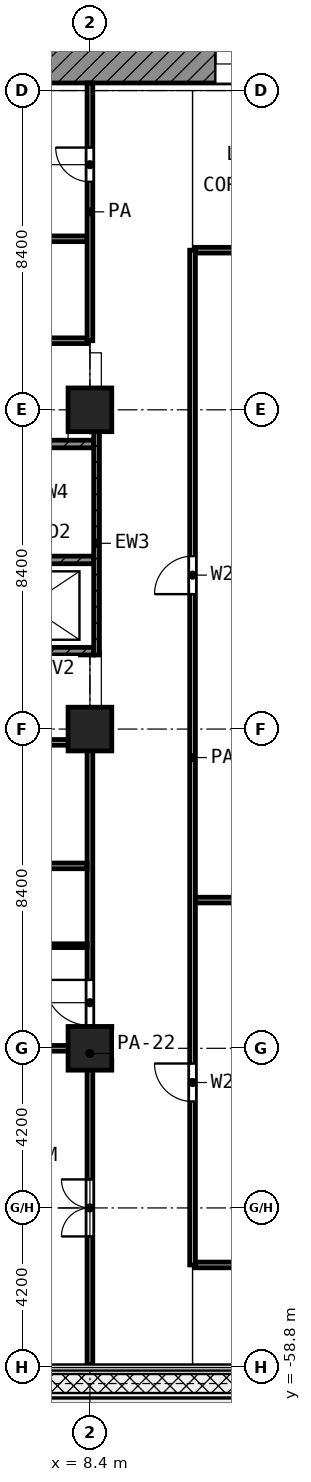
"""IFC4 building model, lengths in metres.
Left out: names, types, materials, properties, quantities, classifications, styles, units other than length and angle.
Written with IfcOpenShell. Run it as: python <this file> out.ifc"""

import sys

from ifc_helpers import new_model, si_unit, direction, frame, frame_2d, origin, origin_2d, place, context, subcontext, project, spatial, rectangle, extrude, element, fill, save


model = new_model("IFC4")
c1 = context("Model", 3, precision=1e-05, world=origin(), true_north=direction((0.0, 1.0)))
c2 = subcontext(c1, "Body", "Model", "MODEL_VIEW")
j1 = project(units=[si_unit("LENGTHUNIT", "METRE"), si_unit("PLANEANGLEUNIT", "RADIAN")], contexts=[c1])
p1 = place(None, origin())
s1 = spatial("IfcSite", under=j1, at=p1, CompositionType="ELEMENT")
p2 = place(p1, origin())
s2 = spatial("IfcBuilding", under=s1, at=p2, CompositionType="ELEMENT")
p3 = place(p2, frame((0.0, 0.0, 136.6)))
s3 = spatial("IfcBuildingStorey", under=s2, at=p3, CompositionType="ELEMENT", Elevation=136.6)
for number, where, z_axis, x_axis in (
    (1, (8.4, -33.6, 0.0), (0.0, 0.0, 1.0), (1.0, 0.0, 0.0)),
    (2, (8.4, -42.0, 0.0), (0.0, 0.0, 1.0), (1.0, 0.0, 0.0)),
    (3, (8.4, -50.4, 0.0), (0.0, 0.0, 1.0), (1.0, 0.0, 0.0)),
):
    element("IfcColumn", number, at=place(p3, frame(where, z_axis=z_axis, x_axis=x_axis)), inside=s3, PredefinedType="COLUMN", context=c2, shape_type="SweptSolid", body=[
        extrude(rectangle(XDim=1.15, YDim=1.15, at=origin_2d()), origin(), (0.0, 0.0, 1.0), 4.2),
    ])
p4 = place(p3, frame((5.4, -24.5, 0.0), z_axis=(0.0, 0.0, 1.0), x_axis=(1.0, 0.0, 0.0)))
e4 = element("IfcWall", 4, at=p4, inside=s3, PredefinedType="SHEAR", context=c2, shape_type="SweptSolid", body=[
    extrude(rectangle(XDim=18.6, YDim=1.0, at=frame_2d((9.3, 0.0))), origin(), (0.0, 0.0, 1.0), 3.6),
])
p5 = place(p4, frame((6.3, 0.0, 0.0)))
e5 = element("IfcOpeningElement", 5, at=p5, cuts=e4, PredefinedType="OPENING", context=c2, shape_type="SweptSolid", body=[
    extrude(rectangle(XDim=1.8, YDim=2.1, at=frame_2d((0.9, 1.05))), frame((0.0, 0.51, 0.0), z_axis=(0.0, -1.0, 0.0), x_axis=(1.0, 0.0, 0.0)), (0.0, 0.0, 1.0), 1.02),
])
p6 = place(p3, frame((8.575, -40.05, 0.0), z_axis=(0.0, 0.0, 1.0), x_axis=(0.0, 1.0, 0.0)))
e6 = element("IfcWall", 6, at=p6, inside=s3, PredefinedType="SHEAR", context=c2, shape_type="SweptSolid", body=[
    extrude(rectangle(XDim=5.875, YDim=0.15, at=frame_2d((2.938, 0.0))), origin(), (0.0, 0.0, 1.0), 3.6),
])
p7 = place(p3, frame((0.45, -34.5, 0.0), z_axis=(0.0, 0.0, 1.0), x_axis=(1.0, 0.0, 0.0)))
e7 = element("IfcWall", 7, at=p7, inside=s3, PredefinedType="SHEAR", context=c2, shape_type="SweptSolid", body=[
    extrude(rectangle(XDim=8.05, YDim=0.2, at=frame_2d((4.025, 0.0))), origin(), (0.0, 0.0, 1.0), 3.6),
])
p8 = place(p7, frame((0.75, 0.0, 0.0)))
e8 = element("IfcOpeningElement", 8, at=p8, cuts=e7, PredefinedType="OPENING", context=c2, shape_type="SweptSolid", body=[
    extrude(rectangle(XDim=1.1, YDim=2.1, at=frame_2d((0.55, 1.05))), frame((0.0, 0.11, 0.0), z_axis=(0.0, -1.0, 0.0), x_axis=(1.0, 0.0, 0.0)), (0.0, 0.0, 1.0), 0.22),
])
p9 = place(p3, frame((0.45, -37.55, 0.0), z_axis=(0.0, 0.0, 1.0), x_axis=(1.0, 0.0, 0.0)))
e9 = element("IfcWall", 9, at=p9, inside=s3, PredefinedType="SHEAR", context=c2, shape_type="SweptSolid", body=[
    extrude(rectangle(XDim=8.05, YDim=0.2, at=frame_2d((4.025, 0.0))), origin(), (0.0, 0.0, 1.0), 3.6),
])
p10 = place(p9, frame((0.1, 0.0, 0.0)))
e10 = element("IfcOpeningElement", 10, at=p10, cuts=e9, PredefinedType="OPENING", context=c2, shape_type="SweptSolid", body=[
    extrude(rectangle(XDim=1.1, YDim=2.1, at=frame_2d((0.55, 1.05))), frame((0.0, 0.11, 0.0), z_axis=(0.0, -1.0, 0.0), x_axis=(1.0, 0.0, 0.0)), (0.0, 0.0, 1.0), 0.22),
])
p11 = place(p3, frame((0.45, -39.95, 0.0), z_axis=(0.0, 0.0, 1.0), x_axis=(1.0, 0.0, 0.0)))
e11 = element("IfcWall", 11, at=p11, inside=s3, PredefinedType="SHEAR", context=c2, shape_type="SweptSolid", body=[
    extrude(rectangle(XDim=8.05, YDim=0.2, at=frame_2d((4.025, 0.0))), origin(), (0.0, 0.0, 1.0), 3.6),
])
p12 = place(p11, frame((2.0, 0.0, 0.0)))
e12 = element("IfcOpeningElement", 12, at=p12, cuts=e11, PredefinedType="OPENING", context=c2, shape_type="SweptSolid", body=[
    extrude(rectangle(XDim=1.1, YDim=2.1, at=frame_2d((0.55, 1.05))), frame((0.0, 0.11, 0.0), z_axis=(0.0, -1.0, 0.0), x_axis=(1.0, 0.0, 0.0)), (0.0, 0.0, 1.0), 0.22),
])
p13 = place(p3, frame((5.75, -47.7, 0.0), z_axis=(0.0, 0.0, 1.0), x_axis=(1.0, 0.0, 0.0)))
e13 = element("IfcWall", 13, at=p13, inside=s3, PredefinedType="PARTITIONING", context=c2, shape_type="SweptSolid", body=[
    extrude(rectangle(XDim=2.575, YDim=0.1, at=frame_2d((1.288, 0.0))), origin(), (0.0, 0.0, 1.0), 3.6),
])
p14 = place(p3, frame((11.175, -56.1, 0.0), z_axis=(0.0, 0.0, 1.0), x_axis=(1.0, 0.0, 0.0)))
e14 = element("IfcWall", 14, at=p14, inside=s3, PredefinedType="PARTITIONING", context=c2, shape_type="SweptSolid", body=[
    extrude(rectangle(XDim=2.85, YDim=0.15, at=frame_2d((1.425, 0.0))), origin(), (0.0, 0.0, 1.0), 3.6),
])
p15 = place(p3, frame((0.08, -50.4, 0.0), z_axis=(0.0, 0.0, 1.0), x_axis=(1.0, 0.0, 0.0)))
e15 = element("IfcWall", 15, at=p15, inside=s3, PredefinedType="PARTITIONING", context=c2, shape_type="SweptSolid", body=[
    extrude(rectangle(XDim=8.245, YDim=0.15, at=frame_2d((4.123, 0.0))), origin(), (0.0, 0.0, 1.0), 3.6),
])
p16 = place(p3, frame((11.175, -46.5, 0.0), z_axis=(0.0, 0.0, 1.0), x_axis=(1.0, 0.0, 0.0)))
e16 = element("IfcWall", 16, at=p16, inside=s3, PredefinedType="PARTITIONING", context=c2, shape_type="SweptSolid", body=[
    extrude(rectangle(XDim=2.85, YDim=0.15, at=frame_2d((1.425, 0.0))), origin(), (0.0, 0.0, 1.0), 3.6),
])
p17 = place(p3, frame((0.08, -45.6, 0.0), z_axis=(0.0, 0.0, 1.0), x_axis=(1.0, 0.0, 0.0)))
e17 = element("IfcWall", 17, at=p17, inside=s3, PredefinedType="PARTITIONING", context=c2, shape_type="SweptSolid", body=[
    extrude(rectangle(XDim=8.245, YDim=0.15, at=frame_2d((4.123, 0.0))), origin(), (0.0, 0.0, 1.0), 3.6),
])
p18 = place(p3, frame((2.327, -42.35, 0.0), z_axis=(0.0, 0.0, 1.0), x_axis=(1.0, 0.0, 0.0)))
e18 = element("IfcWall", 18, at=p18, inside=s3, PredefinedType="PARTITIONING", context=c2, shape_type="SweptSolid", body=[
    extrude(rectangle(XDim=5.998, YDim=0.15, at=frame_2d((2.999, 0.0))), origin(), (0.0, 0.0, 1.0), 3.6),
])
p19 = place(p18, frame((2.499, 0.0, 0.0)))
e19 = element("IfcOpeningElement", 19, at=p19, cuts=e18, PredefinedType="OPENING", context=c2, shape_type="SweptSolid", body=[
    extrude(rectangle(XDim=1.0, YDim=2.1, at=frame_2d((0.5, 1.05))), frame((0.0, 0.085, 0.0), z_axis=(0.0, -1.0, 0.0), x_axis=(1.0, 0.0, 0.0)), (0.0, 0.0, 1.0), 0.17),
])
p20 = place(p3, frame((1.077, -31.782, 0.0), z_axis=(0.0, 0.0, 1.0), x_axis=(1.0, 0.0, 0.0)))
e20 = element("IfcWall", 20, at=p20, inside=s3, PredefinedType="PARTITIONING", context=c2, shape_type="SweptSolid", body=[
    extrude(rectangle(XDim=7.248, YDim=0.15, at=frame_2d((3.624, 0.0))), origin(), (0.0, 0.0, 1.0), 3.6),
])
p21 = place(p20, frame((3.024, 0.0, 0.0)))
e21 = element("IfcOpeningElement", 21, at=p21, cuts=e20, PredefinedType="OPENING", context=c2, shape_type="SweptSolid", body=[
    extrude(rectangle(XDim=1.2, YDim=2.1, at=frame_2d((0.6, 1.05))), frame((0.0, 0.085, 0.0), z_axis=(0.0, -1.0, 0.0), x_axis=(1.0, 0.0, 0.0)), (0.0, 0.0, 1.0), 0.17),
])
p22 = place(p3, frame((11.175, -29.4, 0.0), z_axis=(0.0, 0.0, 1.0), x_axis=(1.0, 0.0, 0.0)))
e22 = element("IfcWall", 22, at=p22, inside=s3, PredefinedType="PARTITIONING", context=c2, shape_type="SweptSolid", body=[
    extrude(rectangle(XDim=2.85, YDim=0.15, at=frame_2d((1.425, 0.0))), origin(), (0.0, 0.0, 1.0), 3.6),
])
p23 = place(p3, frame((0.08, -29.1, 0.0), z_axis=(0.0, 0.0, 1.0), x_axis=(1.0, 0.0, 0.0)))
e23 = element("IfcWall", 23, at=p23, inside=s3, PredefinedType="PARTITIONING", context=c2, shape_type="SweptSolid", body=[
    extrude(rectangle(XDim=8.245, YDim=0.15, at=frame_2d((4.123, 0.0))), origin(), (0.0, 0.0, 1.0), 3.6),
])
p24 = place(p3, frame((8.4, -58.72, 0.0), z_axis=(0.0, 0.0, 1.0), x_axis=(0.0, 1.0, 0.0)))
e24 = element("IfcWall", 24, at=p24, inside=s3, PredefinedType="PARTITIONING", context=c2, shape_type="SweptSolid", body=[
    extrude(rectangle(XDim=16.37, YDim=0.15, at=frame_2d((8.185, 0.0))), origin(), (0.0, 0.0, 1.0), 2.7),
])
p25 = place(p24, frame((8.92, 0.0, 0.0)))
e25 = element("IfcOpeningElement", 25, at=p25, cuts=e24, PredefinedType="OPENING", context=c2, shape_type="SweptSolid", body=[
    extrude(rectangle(XDim=1.2, YDim=2.1, at=frame_2d((0.6, 1.05))), frame((0.0, 0.085, 0.0), z_axis=(0.0, -1.0, 0.0), x_axis=(1.0, 0.0, 0.0)), (0.0, 0.0, 1.0), 0.17),
])
p26 = place(p24, frame((3.37, 0.0, 0.0)))
e26 = element("IfcOpeningElement", 26, at=p26, cuts=e24, PredefinedType="OPENING", context=c2, shape_type="SweptSolid", body=[
    extrude(rectangle(XDim=1.5, YDim=2.1, at=frame_2d((0.75, 1.05))), frame((0.0, 0.085, 0.0), z_axis=(0.0, -1.0, 0.0), x_axis=(1.0, 0.0, 0.0)), (0.0, 0.0, 1.0), 0.17),
])
p27 = place(p3, frame((8.4, -31.782, 0.0), z_axis=(0.0, 0.0, 1.0), x_axis=(0.0, 1.0, 0.0)))
e27 = element("IfcWall", 27, at=p27, inside=s3, PredefinedType="PARTITIONING", context=c2, shape_type="SweptSolid", body=[
    extrude(rectangle(XDim=6.782, YDim=0.15, at=frame_2d((3.391, 0.0))), origin(), (0.0, 0.0, 1.0), 3.6),
])
p28 = place(p27, frame((4.182, 0.0, 0.0)))
e28 = element("IfcOpeningElement", 28, at=p28, cuts=e27, PredefinedType="OPENING", context=c2, shape_type="SweptSolid", body=[
    extrude(rectangle(XDim=0.9, YDim=2.1, at=frame_2d((0.45, 1.05))), frame((0.0, 0.085, 0.0), z_axis=(0.0, -1.0, 0.0), x_axis=(1.0, 0.0, 0.0)), (0.0, 0.0, 1.0), 0.17),
])
p29 = place(p3, frame((11.1, -56.1, 0.0), z_axis=(0.0, 0.0, 1.0), x_axis=(0.0, 1.0, 0.0)))
e29 = element("IfcWall", 29, at=p29, inside=s3, PredefinedType="PARTITIONING", context=c2, shape_type="SweptSolid", body=[
    extrude(rectangle(XDim=26.7, YDim=0.15, at=frame_2d((13.35, 0.0))), origin(), (0.0, 0.0, 1.0), 3.6),
])
p30 = place(p29, frame((17.65, 0.0, 0.0)))
e30 = element("IfcOpeningElement", 30, at=p30, cuts=e29, PredefinedType="OPENING", context=c2, shape_type="SweptSolid", body=[
    extrude(rectangle(XDim=1.0, YDim=2.1, at=frame_2d((0.5, 1.05))), frame((0.0, 0.085, 0.0), z_axis=(0.0, -1.0, 0.0), x_axis=(1.0, 0.0, 0.0)), (0.0, 0.0, 1.0), 0.17),
])
p31 = place(p29, frame((4.3, 0.0, 0.0)))
e31 = element("IfcOpeningElement", 31, at=p31, cuts=e29, PredefinedType="OPENING", context=c2, shape_type="SweptSolid", body=[
    extrude(rectangle(XDim=1.0, YDim=2.1, at=frame_2d((0.5, 1.05))), frame((0.0, 0.085, 0.0), z_axis=(0.0, -1.0, 0.0), x_axis=(1.0, 0.0, 0.0)), (0.0, 0.0, 1.0), 0.17),
])
p32 = place(p5, origin())
e32 = element("IfcDoor", 32, at=p32, inside=s3, OperationType="DOUBLE_DOOR_SINGLE_SWING", PredefinedType="DOOR", context=c2, shape_type="SweptSolid", body=[
    extrude(rectangle(XDim=1.8, YDim=2.1, at=frame_2d((0.9, 1.05))), frame((0.0, 0.025, 0.0), z_axis=(0.0, -1.0, 0.0), x_axis=(1.0, 0.0, 0.0)), (0.0, 0.0, 1.0), 0.05),
])
fill(e5, e32)
p33 = place(p28, origin())
e33 = element("IfcDoor", 33, at=p33, inside=s3, OperationType="SINGLE_SWING_RIGHT", PredefinedType="DOOR", context=c2, shape_type="SweptSolid", body=[
    extrude(rectangle(XDim=0.9, YDim=2.1, at=frame_2d((0.45, 1.05))), frame((0.0, 0.025, 0.0), z_axis=(0.0, -1.0, 0.0), x_axis=(1.0, 0.0, 0.0)), (0.0, 0.0, 1.0), 0.05),
])
fill(e28, e33)
p34 = place(p25, origin())
e34 = element("IfcDoor", 34, at=p34, inside=s3, OperationType="SINGLE_SWING_RIGHT", PredefinedType="DOOR", context=c2, shape_type="SweptSolid", body=[
    extrude(rectangle(XDim=1.2, YDim=2.1, at=frame_2d((0.6, 1.05))), frame((0.0, 0.025, 0.0), z_axis=(0.0, -1.0, 0.0), x_axis=(1.0, 0.0, 0.0)), (0.0, 0.0, 1.0), 0.05),
])
fill(e25, e34)
p35 = place(p26, origin())
e35 = element("IfcDoor", 35, at=p35, inside=s3, OperationType="DOUBLE_DOOR_SINGLE_SWING", PredefinedType="DOOR", context=c2, shape_type="SweptSolid", body=[
    extrude(rectangle(XDim=1.5, YDim=2.1, at=frame_2d((0.75, 1.05))), frame((0.0, 0.025, 0.0), z_axis=(0.0, -1.0, 0.0), x_axis=(1.0, 0.0, 0.0)), (0.0, 0.0, 1.0), 0.05),
])
fill(e26, e35)
p36 = place(p30, origin())
e36 = element("IfcDoor", 36, at=p36, inside=s3, OperationType="SINGLE_SWING_LEFT", PredefinedType="DOOR", context=c2, shape_type="SweptSolid", body=[
    extrude(rectangle(XDim=1.0, YDim=2.1, at=frame_2d((0.5, 1.05))), frame((0.0, 0.025, 0.0), z_axis=(0.0, -1.0, 0.0), x_axis=(1.0, 0.0, 0.0)), (0.0, 0.0, 1.0), 0.05),
])
fill(e30, e36)
p37 = place(p31, origin())
e37 = element("IfcDoor", 37, at=p37, inside=s3, OperationType="SINGLE_SWING_RIGHT", PredefinedType="DOOR", context=c2, shape_type="SweptSolid", body=[
    extrude(rectangle(XDim=1.0, YDim=2.1, at=frame_2d((0.5, 1.05))), frame((0.0, 0.025, 0.0), z_axis=(0.0, -1.0, 0.0), x_axis=(1.0, 0.0, 0.0)), (0.0, 0.0, 1.0), 0.05),
])
fill(e31, e37)
save(model, sys.argv[1])
